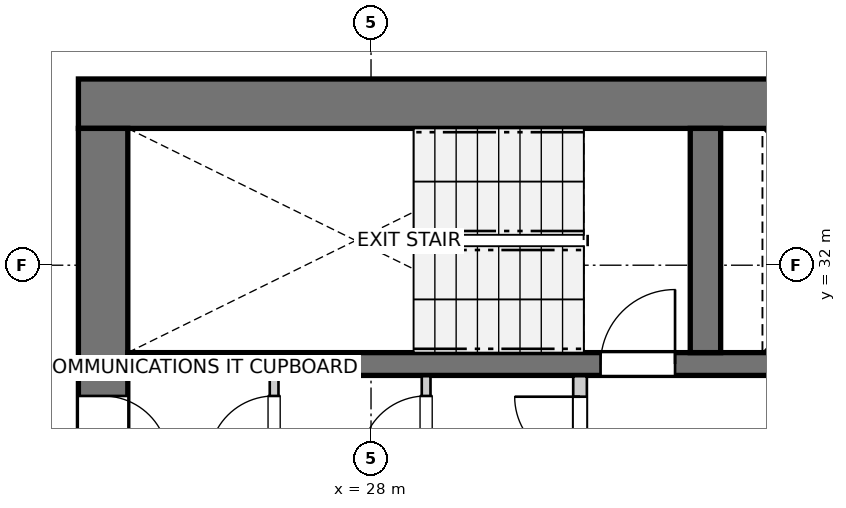
"""IFC4 building model, lengths in metres.
Left out: names, types, materials, properties, quantities, classifications, styles, units other than length and angle.
Written with IfcOpenShell. Run it as: python <this file> out.ifc"""

import sys

from ifc_helpers import new_model, si_unit, direction, frame, frame_2d, origin, place, context, subcontext, project, spatial, rectangle, extrude, source, transform, mapped, element, fill, save


model = new_model("IFC4")
c1 = context("Model", 3, precision=1e-05, world=origin(), true_north=direction((0.0, 1.0)))
c2 = subcontext(c1, "Body", "Model", "MODEL_VIEW")
j1 = project(units=[si_unit("LENGTHUNIT", "METRE"), si_unit("PLANEANGLEUNIT", "RADIAN")], contexts=[c1])
p1 = place(None, origin())
s1 = spatial("IfcSite", under=j1, at=p1, CompositionType="ELEMENT")
p2 = place(p1, origin())
s2 = spatial("IfcBuilding", under=s1, at=p2, CompositionType="ELEMENT")
p3 = place(p2, frame((0.0, 0.0, 92.8)))
s3 = spatial("IfcBuildingStorey", under=s2, at=p3, CompositionType="ELEMENT", Elevation=92.8)
p4 = place(p3, frame((36.55, 34.125, 0.0), z_axis=(0.0, 0.0, 1.0), x_axis=(-1.0, 0.0, 0.0)))
e1 = element("IfcWall", 1, at=p4, inside=s3, PredefinedType="SHEAR", context=c2, shape_type="SweptSolid", body=[
    extrude(rectangle(XDim=12.4, YDim=0.65, at=frame_2d((6.2, 0.0))), origin(), (0.0, 0.0, 1.0), 2.95),
])
p5 = place(p3, frame((24.475, 33.8, 0.0), z_axis=(0.0, 0.0, 1.0), x_axis=(0.0, -1.0, 0.0)))
e2 = element("IfcWall", 2, at=p5, inside=s3, PredefinedType="SHEAR", context=c2, shape_type="SweptSolid", body=[
    extrude(rectangle(XDim=15.6, YDim=0.65, at=frame_2d((7.8, 0.0))), origin(), (0.0, 0.0, 1.0), 2.95),
])
p6 = place(p5, frame((7.05, 0.0, 0.0)))
e3 = element("IfcOpeningElement", 3, at=p6, cuts=e2, PredefinedType="OPENING", context=c2, shape_type="SweptSolid", body=[
    extrude(rectangle(XDim=1.5, YDim=2.15, at=frame_2d((0.75, 1.075))), frame((0.0, 0.335, 0.0), z_axis=(0.0, -1.0, 0.0), x_axis=(1.0, 0.0, 0.0)), (0.0, 0.0, 1.0), 0.67),
])
p7 = place(p5, frame((3.52, 0.0, 0.0)))
e4 = element("IfcOpeningElement", 4, at=p7, cuts=e2, PredefinedType="OPENING", context=c2, shape_type="SweptSolid", body=[
    extrude(rectangle(XDim=0.86, YDim=2.05, at=frame_2d((0.43, 1.025))), frame((0.0, 0.335, 0.0), z_axis=(0.0, -1.0, 0.0), x_axis=(1.0, 0.0, 0.0)), (0.0, 0.0, 1.0), 0.67),
])
p8 = place(p5, frame((11.22, 0.0, 0.0)))
e5 = element("IfcOpeningElement", 5, at=p8, cuts=e2, PredefinedType="OPENING", context=c2, shape_type="SweptSolid", body=[
    extrude(rectangle(XDim=0.86, YDim=2.05, at=frame_2d((0.43, 1.025))), frame((0.0, 0.335, 0.0), z_axis=(0.0, -1.0, 0.0), x_axis=(1.0, 0.0, 0.0)), (0.0, 0.0, 1.0), 0.67),
])
p9 = place(p3, frame((24.8, 30.7, 0.0), z_axis=(0.0, 0.0, 1.0), x_axis=(1.0, 0.0, 0.0)))
e6 = element("IfcWall", 6, at=p9, inside=s3, PredefinedType="SHEAR", context=c2, shape_type="SweptSolid", body=[
    extrude(rectangle(XDim=11.1, YDim=0.3, at=frame_2d((5.55, 0.0))), origin(), (0.0, 0.0, 1.0), 2.95),
])
p10 = place(p9, frame((6.22, 0.0, 0.0)))
e7 = element("IfcOpeningElement", 7, at=p10, cuts=e6, PredefinedType="OPENING", context=c2, shape_type="SweptSolid", body=[
    extrude(rectangle(XDim=0.98, YDim=2.15, at=frame_2d((0.49, 1.075))), frame((0.0, 0.16, 0.0), z_axis=(0.0, -1.0, 0.0), x_axis=(1.0, 0.0, 0.0)), (0.0, 0.0, 1.0), 0.32),
])
p11 = place(p9, frame((9.15, 0.0, 0.0)))
e8 = element("IfcOpeningElement", 8, at=p11, cuts=e6, PredefinedType="OPENING", context=c2, shape_type="SweptSolid", body=[
    extrude(rectangle(XDim=1.15, YDim=2.15, at=frame_2d((0.575, 1.075))), frame((0.0, 0.16, 0.0), z_axis=(0.0, -1.0, 0.0), x_axis=(1.0, 0.0, 0.0)), (0.0, 0.0, 1.0), 0.32),
])
p12 = place(p3, frame((32.4, 30.85, 0.0), z_axis=(0.0, 0.0, 1.0), x_axis=(0.0, 1.0, 0.0)))
e9 = element("IfcWall", 9, at=p12, inside=s3, PredefinedType="SHEAR", context=c2, shape_type="SweptSolid", body=[
    extrude(rectangle(XDim=2.95, YDim=0.4, at=frame_2d((1.475, 0.0))), origin(), (0.0, 0.0, 1.0), 2.95),
])
p13 = place(p3, frame((30.75, 27.43, 0.0), z_axis=(0.0, 0.0, 1.0), x_axis=(0.0, 1.0, 0.0)))
e10 = element("IfcWall", 10, at=p13, inside=s3, PredefinedType="PARTITIONING", context=c2, shape_type="SweptSolid", body=[
    extrude(rectangle(XDim=3.11, YDim=0.18, at=frame_2d((1.555, 0.0))), origin(), (0.0, 0.0, 1.0), 2.95),
])
p14 = place(p13, frame((1.98, 0.0, 0.0)))
e11 = element("IfcOpeningElement", 11, at=p14, cuts=e10, PredefinedType="OPENING", context=c2, shape_type="SweptSolid", body=[
    extrude(rectangle(XDim=0.86, YDim=2.05, at=frame_2d((0.43, 1.025))), frame((0.0, 0.1, 0.0), z_axis=(0.0, -1.0, 0.0), x_axis=(1.0, 0.0, 0.0)), (0.0, 0.0, 1.0), 0.2),
])
p15 = place(p3, frame((26.725, 29.16, 0.0), z_axis=(0.0, 0.0, 1.0), x_axis=(0.0, 1.0, 0.0)))
e12 = element("IfcWall", 12, at=p15, inside=s3, PredefinedType="PARTITIONING", context=c2, shape_type="SweptSolid", body=[
    extrude(rectangle(XDim=1.38, YDim=0.115, at=frame_2d((0.69, 0.0))), origin(), (0.0, 0.0, 1.0), 2.95),
])
p16 = place(p15, frame((0.26, 0.0, 0.0)))
e13 = element("IfcOpeningElement", 13, at=p16, cuts=e12, PredefinedType="OPENING", context=c2, shape_type="SweptSolid", body=[
    extrude(rectangle(XDim=0.86, YDim=2.05, at=frame_2d((0.43, 1.025))), frame((0.0, 0.067, 0.0), z_axis=(0.0, -1.0, 0.0), x_axis=(1.0, 0.0, 0.0)), (0.0, 0.0, 1.0), 0.135),
])
p17 = place(p3, frame((28.725, 29.16, 0.0), z_axis=(0.0, 0.0, 1.0), x_axis=(0.0, 1.0, 0.0)))
e14 = element("IfcWall", 14, at=p17, inside=s3, PredefinedType="PARTITIONING", context=c2, shape_type="SweptSolid", body=[
    extrude(rectangle(XDim=1.38, YDim=0.115, at=frame_2d((0.69, 0.0))), origin(), (0.0, 0.0, 1.0), 2.95),
])
p18 = place(p17, frame((0.26, 0.0, 0.0)))
e15 = element("IfcOpeningElement", 15, at=p18, cuts=e14, PredefinedType="OPENING", context=c2, shape_type="SweptSolid", body=[
    extrude(rectangle(XDim=0.86, YDim=2.05, at=frame_2d((0.43, 1.025))), frame((0.0, 0.067, 0.0), z_axis=(0.0, -1.0, 0.0), x_axis=(1.0, 0.0, 0.0)), (0.0, 0.0, 1.0), 0.135),
])
m1 = source(origin(), c2, "Body", "SweptSolid", [
    extrude(rectangle(XDim=0.98, YDim=2.15, at=frame_2d((0.49, 1.075))), frame((0.0, 0.025, 0.0), z_axis=(0.0, -1.0, 0.0), x_axis=(1.0, 0.0, 0.0)), (0.0, 0.0, 1.0), 0.05),
])
p19 = place(p10, origin())
e16 = element("IfcDoor", 16, at=p19, inside=s3, OperationType="SINGLE_SWING_RIGHT", PredefinedType="DOOR", context=c2, shape_type="MappedRepresentation", body=[
    mapped(m1, transform((0.0, 0.0, 0.0), x_axis=(1.0, 0.0, 0.0), y_axis=(0.0, 1.0, 0.0), z_axis=(0.0, 0.0, 1.0), scale=1.0)),
])
fill(e7, e16)
m2 = source(origin(), c2, "Body", "SweptSolid", [
    extrude(rectangle(XDim=0.86, YDim=2.05, at=frame_2d((0.43, 1.025))), frame((0.0, 0.025, 0.0), z_axis=(0.0, -1.0, 0.0), x_axis=(1.0, 0.0, 0.0)), (0.0, 0.0, 1.0), 0.05),
])
p20 = place(p7, origin())
e17 = element("IfcDoor", 17, at=p20, inside=s3, OperationType="SINGLE_SWING_RIGHT", PredefinedType="DOOR", context=c2, shape_type="MappedRepresentation", body=[
    mapped(m2, transform((0.0, 0.0, 0.0), x_axis=(1.0, 0.0, 0.0), y_axis=(0.0, 1.0, 0.0), z_axis=(0.0, 0.0, 1.0), scale=1.0)),
])
fill(e4, e17)
p21 = place(p14, origin())
e18 = element("IfcDoor", 18, at=p21, inside=s3, OperationType="SINGLE_SWING_RIGHT", PredefinedType="DOOR", context=c2, shape_type="MappedRepresentation", body=[
    mapped(m2, transform((0.0, 0.0, 0.0), x_axis=(1.0, 0.0, 0.0), y_axis=(0.0, 1.0, 0.0), z_axis=(0.0, 0.0, 1.0), scale=1.0)),
])
fill(e11, e18)
p22 = place(p16, origin())
e19 = element("IfcDoor", 19, at=p22, inside=s3, OperationType="SINGLE_SWING_LEFT", PredefinedType="DOOR", context=c2, shape_type="MappedRepresentation", body=[
    mapped(m2, transform((0.0, 0.0, 0.0), x_axis=(1.0, 0.0, 0.0), y_axis=(0.0, 1.0, 0.0), z_axis=(0.0, 0.0, 1.0), scale=1.0)),
])
fill(e13, e19)
p23 = place(p18, origin())
e20 = element("IfcDoor", 20, at=p23, inside=s3, OperationType="SINGLE_SWING_LEFT", PredefinedType="DOOR", context=c2, shape_type="MappedRepresentation", body=[
    mapped(m2, transform((0.0, 0.0, 0.0), x_axis=(1.0, 0.0, 0.0), y_axis=(0.0, 1.0, 0.0), z_axis=(0.0, 0.0, 1.0), scale=1.0)),
])
fill(e15, e20)
save(model, sys.argv[1])
